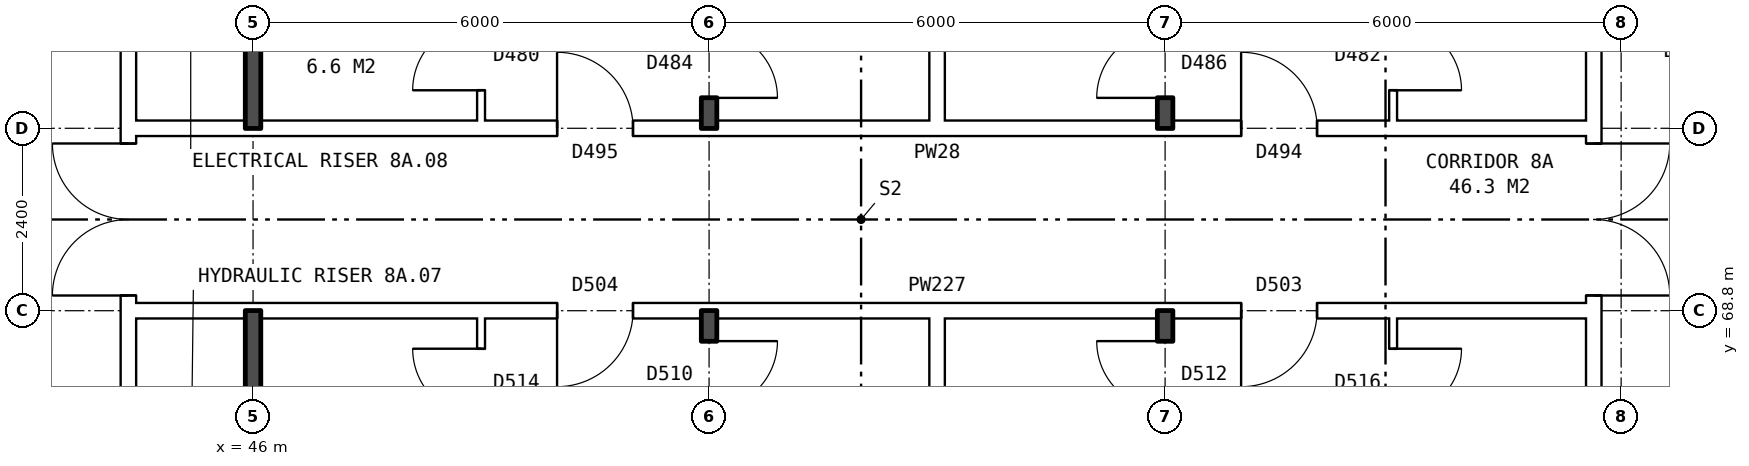
"""IFC4 building model, lengths in metres.
Left out: names, types, materials, properties, quantities, classifications, styles, units other than length and angle.
Written with IfcOpenShell. Run it as: python <this file> out.ifc"""

import sys

from ifc_helpers import new_model, si_unit, direction, frame, frame_2d, origin, place, context, subcontext, project, spatial, rectangle, extrude, element, fill, save


model = new_model("IFC4")
c1 = context("Model", 3, precision=1e-05, world=origin(), true_north=direction((0.0, 1.0)))
c2 = subcontext(c1, "Body", "Model", "MODEL_VIEW")
j1 = project(units=[si_unit("LENGTHUNIT", "METRE"), si_unit("PLANEANGLEUNIT", "RADIAN")], contexts=[c1])
p1 = place(None, origin())
s1 = spatial("IfcSite", under=j1, at=p1, CompositionType="ELEMENT")
p2 = place(p1, origin())
s2 = spatial("IfcBuilding", under=s1, at=p2, CompositionType="ELEMENT")
p3 = place(p2, frame((0.0, 0.0, 31.9)))
s3 = spatial("IfcBuildingStorey", under=s2, at=p3, CompositionType="ELEMENT", Elevation=31.9)
p4 = place(p3, frame((63.64, 63.9, 0.0), z_axis=(0.0, 0.0, 1.0), x_axis=(0.0, 1.0, 0.0)))
e1 = element("IfcWall", 1, at=p4, inside=s3, PredefinedType="PARTITIONING", context=c2, shape_type="SweptSolid", body=[
    extrude(rectangle(XDim=12.2, YDim=0.2, at=frame_2d((6.1, 0.0))), origin(), (0.0, 0.0, 1.0), 2.85),
])
p5 = place(p4, frame((5.1, 0.0, 0.0)))
e2 = element("IfcOpeningElement", 2, at=p5, cuts=e1, PredefinedType="OPENING", context=c2, shape_type="SweptSolid", body=[
    extrude(rectangle(XDim=2.0, YDim=2.1, at=frame_2d((1.0, 1.05))), frame((0.0, 0.11, 0.0), z_axis=(0.0, -1.0, 0.0), x_axis=(1.0, 0.0, 0.0)), (0.0, 0.0, 1.0), 0.22),
])
p6 = place(p3, frame((44.36, 63.9, 0.0), z_axis=(0.0, 0.0, 1.0), x_axis=(0.0, 1.0, 0.0)))
e3 = element("IfcWall", 3, at=p6, inside=s3, PredefinedType="PARTITIONING", context=c2, shape_type="SweptSolid", body=[
    extrude(rectangle(XDim=12.2, YDim=0.2, at=frame_2d((6.1, 0.0))), origin(), (0.0, 0.0, 1.0), 2.85),
])
p7 = place(p6, frame((5.1, 0.0, 0.0)))
e4 = element("IfcOpeningElement", 4, at=p7, cuts=e3, PredefinedType="OPENING", context=c2, shape_type="SweptSolid", body=[
    extrude(rectangle(XDim=2.0, YDim=2.1, at=frame_2d((1.0, 1.05))), frame((0.0, 0.11, 0.0), z_axis=(0.0, -1.0, 0.0), x_axis=(1.0, 0.0, 0.0)), (0.0, 0.0, 1.0), 0.22),
])
p8 = place(p3, frame((44.36, 68.8, 0.0), z_axis=(0.0, 0.0, 1.0), x_axis=(1.0, 0.0, 0.0)))
e5 = element("IfcWall", 5, at=p8, inside=s3, PredefinedType="PARTITIONING", context=c2, shape_type="SweptSolid", body=[
    extrude(rectangle(XDim=19.28, YDim=0.2, at=frame_2d((9.64, 0.0))), origin(), (0.0, 0.0, 1.0), 2.85),
])
p9 = place(p8, frame((14.64, 0.0, 0.0)))
e6 = element("IfcOpeningElement", 6, at=p9, cuts=e5, PredefinedType="OPENING", context=c2, shape_type="SweptSolid", body=[
    extrude(rectangle(XDim=1.0, YDim=2.1, at=frame_2d((0.5, 1.05))), frame((0.0, 0.11, 0.0), z_axis=(0.0, -1.0, 0.0), x_axis=(1.0, 0.0, 0.0)), (0.0, 0.0, 1.0), 0.22),
])
p10 = place(p8, frame((5.64, 0.0, 0.0)))
e7 = element("IfcOpeningElement", 7, at=p10, cuts=e5, PredefinedType="OPENING", context=c2, shape_type="SweptSolid", body=[
    extrude(rectangle(XDim=1.0, YDim=2.1, at=frame_2d((0.5, 1.05))), frame((0.0, 0.11, 0.0), z_axis=(0.0, -1.0, 0.0), x_axis=(1.0, 0.0, 0.0)), (0.0, 0.0, 1.0), 0.22),
])
p11 = place(p3, frame((44.36, 71.2, 0.0), z_axis=(0.0, 0.0, 1.0), x_axis=(1.0, 0.0, 0.0)))
e8 = element("IfcWall", 8, at=p11, inside=s3, PredefinedType="PARTITIONING", context=c2, shape_type="SweptSolid", body=[
    extrude(rectangle(XDim=19.28, YDim=0.2, at=frame_2d((9.64, 0.0))), origin(), (0.0, 0.0, 1.0), 2.85),
])
p12 = place(p11, frame((14.64, 0.0, 0.0)))
e9 = element("IfcOpeningElement", 9, at=p12, cuts=e8, PredefinedType="OPENING", context=c2, shape_type="SweptSolid", body=[
    extrude(rectangle(XDim=1.0, YDim=2.1, at=frame_2d((0.5, 1.05))), frame((0.0, 0.11, 0.0), z_axis=(0.0, -1.0, 0.0), x_axis=(1.0, 0.0, 0.0)), (0.0, 0.0, 1.0), 0.22),
])
p13 = place(p11, frame((5.64, 0.0, 0.0)))
e10 = element("IfcOpeningElement", 10, at=p13, cuts=e8, PredefinedType="OPENING", context=c2, shape_type="SweptSolid", body=[
    extrude(rectangle(XDim=1.0, YDim=2.1, at=frame_2d((0.5, 1.05))), frame((0.0, 0.11, 0.0), z_axis=(0.0, -1.0, 0.0), x_axis=(1.0, 0.0, 0.0)), (0.0, 0.0, 1.0), 0.22),
])
for number, where, z_axis, x_axis in (
    (11, (46.0, 63.8, 0.0), (0.0, 0.0, 1.0), (0.0, 1.0, 0.0)),
    (12, (46.0, 71.2, 0.0), (0.0, 0.0, 1.0), (0.0, 1.0, 0.0)),
):
    element("IfcWall", number, at=place(p3, frame(where, z_axis=z_axis, x_axis=x_axis)), inside=s3, PredefinedType="SOLIDWALL", context=c2, shape_type="SweptSolid", body=[
        extrude(rectangle(XDim=5.0, YDim=0.2, at=frame_2d((2.5, 0.0))), origin(), (0.0, 0.0, 1.0), 2.85),
    ])
p14 = place(p3, frame((49.0, 54.36, 0.0), z_axis=(0.0, 0.0, 1.0), x_axis=(0.0, 1.0, 0.0)))
e13 = element("IfcWall", 13, at=p14, inside=s3, PredefinedType="PARTITIONING", context=c2, shape_type="SweptSolid", body=[
    extrude(rectangle(XDim=14.34, YDim=0.1, at=frame_2d((7.17, 0.0))), origin(), (0.0, 0.0, 1.0), 2.85),
])
p15 = place(p14, frame((4.2, 0.0, 0.0)))
e14 = element("IfcOpeningElement", 14, at=p15, cuts=e13, PredefinedType="OPENING", context=c2, shape_type="SweptSolid", body=[
    extrude(rectangle(XDim=0.9, YDim=2.1, at=frame_2d((0.45, 1.05))), frame((0.0, 0.06, 0.0), z_axis=(0.0, -1.0, 0.0), x_axis=(1.0, 0.0, 0.0)), (0.0, 0.0, 1.0), 0.12),
])
p16 = place(p14, frame((13.04, 0.0, 0.0)))
e15 = element("IfcOpeningElement", 15, at=p16, cuts=e13, PredefinedType="OPENING", context=c2, shape_type="SweptSolid", body=[
    extrude(rectangle(XDim=0.9, YDim=2.1, at=frame_2d((0.45, 1.05))), frame((0.0, 0.06, 0.0), z_axis=(0.0, -1.0, 0.0), x_axis=(1.0, 0.0, 0.0)), (0.0, 0.0, 1.0), 0.12),
])
p17 = place(p3, frame((49.0, 71.3, 0.0), z_axis=(0.0, 0.0, 1.0), x_axis=(0.0, 1.0, 0.0)))
e16 = element("IfcWall", 16, at=p17, inside=s3, PredefinedType="PARTITIONING", context=c2, shape_type="SweptSolid", body=[
    extrude(rectangle(XDim=14.34, YDim=0.1, at=frame_2d((7.17, 0.0))), origin(), (0.0, 0.0, 1.0), 2.85),
])
p18 = place(p17, frame((9.24, 0.0, 0.0)))
e17 = element("IfcOpeningElement", 17, at=p18, cuts=e16, PredefinedType="OPENING", context=c2, shape_type="SweptSolid", body=[
    extrude(rectangle(XDim=0.9, YDim=2.1, at=frame_2d((0.45, 1.05))), frame((0.0, 0.06, 0.0), z_axis=(0.0, -1.0, 0.0), x_axis=(1.0, 0.0, 0.0)), (0.0, 0.0, 1.0), 0.12),
])
p19 = place(p17, frame((0.4, 0.0, 0.0)))
e18 = element("IfcOpeningElement", 18, at=p19, cuts=e16, PredefinedType="OPENING", context=c2, shape_type="SweptSolid", body=[
    extrude(rectangle(XDim=0.9, YDim=2.1, at=frame_2d((0.45, 1.05))), frame((0.0, 0.06, 0.0), z_axis=(0.0, -1.0, 0.0), x_axis=(1.0, 0.0, 0.0)), (0.0, 0.0, 1.0), 0.12),
])
p20 = place(p3, frame((52.0, 54.36, 0.0), z_axis=(0.0, 0.0, 1.0), x_axis=(0.0, 1.0, 0.0)))
e19 = element("IfcWall", 19, at=p20, inside=s3, PredefinedType="SOLIDWALL", context=c2, shape_type="SweptSolid", body=[
    extrude(rectangle(XDim=14.44, YDim=0.2, at=frame_2d((7.22, 0.0))), origin(), (0.0, 0.0, 1.0), 2.85),
])
p21 = place(p20, frame((4.2, 0.0, 0.0)))
e20 = element("IfcOpeningElement", 20, at=p21, cuts=e19, PredefinedType="OPENING", context=c2, shape_type="SweptSolid", body=[
    extrude(rectangle(XDim=0.9, YDim=2.1, at=frame_2d((0.45, 1.05))), frame((0.0, 0.11, 0.0), z_axis=(0.0, -1.0, 0.0), x_axis=(1.0, 0.0, 0.0)), (0.0, 0.0, 1.0), 0.22),
])
p22 = place(p20, frame((13.14, 0.0, 0.0)))
e21 = element("IfcOpeningElement", 21, at=p22, cuts=e19, PredefinedType="OPENING", context=c2, shape_type="SweptSolid", body=[
    extrude(rectangle(XDim=0.9, YDim=2.1, at=frame_2d((0.45, 1.05))), frame((0.0, 0.11, 0.0), z_axis=(0.0, -1.0, 0.0), x_axis=(1.0, 0.0, 0.0)), (0.0, 0.0, 1.0), 0.22),
])
p23 = place(p3, frame((52.0, 71.2, 0.0), z_axis=(0.0, 0.0, 1.0), x_axis=(0.0, 1.0, 0.0)))
e22 = element("IfcWall", 22, at=p23, inside=s3, PredefinedType="SOLIDWALL", context=c2, shape_type="SweptSolid", body=[
    extrude(rectangle(XDim=14.44, YDim=0.2, at=frame_2d((7.22, 0.0))), origin(), (0.0, 0.0, 1.0), 2.85),
])
p24 = place(p23, frame((9.34, 0.0, 0.0)))
e23 = element("IfcOpeningElement", 23, at=p24, cuts=e22, PredefinedType="OPENING", context=c2, shape_type="SweptSolid", body=[
    extrude(rectangle(XDim=0.9, YDim=2.1, at=frame_2d((0.45, 1.05))), frame((0.0, 0.11, 0.0), z_axis=(0.0, -1.0, 0.0), x_axis=(1.0, 0.0, 0.0)), (0.0, 0.0, 1.0), 0.22),
])
p25 = place(p23, frame((0.4, 0.0, 0.0)))
e24 = element("IfcOpeningElement", 24, at=p25, cuts=e22, PredefinedType="OPENING", context=c2, shape_type="SweptSolid", body=[
    extrude(rectangle(XDim=0.9, YDim=2.1, at=frame_2d((0.45, 1.05))), frame((0.0, 0.11, 0.0), z_axis=(0.0, -1.0, 0.0), x_axis=(1.0, 0.0, 0.0)), (0.0, 0.0, 1.0), 0.22),
])
for number, where, z_axis, x_axis in (
    (25, (55.0, 54.36, 0.0), (0.0, 0.0, 1.0), (0.0, 1.0, 0.0)),
    (26, (55.0, 71.3, 0.0), (0.0, 0.0, 1.0), (0.0, 1.0, 0.0)),
):
    element("IfcWall", number, at=place(p3, frame(where, z_axis=z_axis, x_axis=x_axis)), inside=s3, PredefinedType="PARTITIONING", context=c2, shape_type="SweptSolid", body=[
        extrude(rectangle(XDim=14.34, YDim=0.2, at=frame_2d((7.17, 0.0))), origin(), (0.0, 0.0, 1.0), 2.85),
    ])
p26 = place(p3, frame((58.0, 54.36, 0.0), z_axis=(0.0, 0.0, 1.0), x_axis=(0.0, 1.0, 0.0)))
e27 = element("IfcWall", 27, at=p26, inside=s3, PredefinedType="SOLIDWALL", context=c2, shape_type="SweptSolid", body=[
    extrude(rectangle(XDim=14.44, YDim=0.2, at=frame_2d((7.22, 0.0))), origin(), (0.0, 0.0, 1.0), 2.85),
])
p27 = place(p26, frame((4.2, 0.0, 0.0)))
e28 = element("IfcOpeningElement", 28, at=p27, cuts=e27, PredefinedType="OPENING", context=c2, shape_type="SweptSolid", body=[
    extrude(rectangle(XDim=0.9, YDim=2.1, at=frame_2d((0.45, 1.05))), frame((0.0, 0.11, 0.0), z_axis=(0.0, -1.0, 0.0), x_axis=(1.0, 0.0, 0.0)), (0.0, 0.0, 1.0), 0.22),
])
p28 = place(p26, frame((13.14, 0.0, 0.0)))
e29 = element("IfcOpeningElement", 29, at=p28, cuts=e27, PredefinedType="OPENING", context=c2, shape_type="SweptSolid", body=[
    extrude(rectangle(XDim=0.9, YDim=2.1, at=frame_2d((0.45, 1.05))), frame((0.0, 0.11, 0.0), z_axis=(0.0, -1.0, 0.0), x_axis=(1.0, 0.0, 0.0)), (0.0, 0.0, 1.0), 0.22),
])
p29 = place(p3, frame((58.0, 71.2, 0.0), z_axis=(0.0, 0.0, 1.0), x_axis=(0.0, 1.0, 0.0)))
e30 = element("IfcWall", 30, at=p29, inside=s3, PredefinedType="SOLIDWALL", context=c2, shape_type="SweptSolid", body=[
    extrude(rectangle(XDim=14.44, YDim=0.2, at=frame_2d((7.22, 0.0))), origin(), (0.0, 0.0, 1.0), 2.85),
])
p30 = place(p29, frame((6.84, 0.0, 0.0)))
e31 = element("IfcOpeningElement", 31, at=p30, cuts=e30, PredefinedType="OPENING", context=c2, shape_type="SweptSolid", body=[
    extrude(rectangle(XDim=0.9, YDim=2.1, at=frame_2d((0.45, 1.05))), frame((0.0, 0.11, 0.0), z_axis=(0.0, -1.0, 0.0), x_axis=(1.0, 0.0, 0.0)), (0.0, 0.0, 1.0), 0.22),
])
p31 = place(p29, frame((0.4, 0.0, 0.0)))
e32 = element("IfcOpeningElement", 32, at=p31, cuts=e30, PredefinedType="OPENING", context=c2, shape_type="SweptSolid", body=[
    extrude(rectangle(XDim=0.9, YDim=2.1, at=frame_2d((0.45, 1.05))), frame((0.0, 0.11, 0.0), z_axis=(0.0, -1.0, 0.0), x_axis=(1.0, 0.0, 0.0)), (0.0, 0.0, 1.0), 0.22),
])
p32 = place(p3, frame((61.0, 54.36, 0.0), z_axis=(0.0, 0.0, 1.0), x_axis=(0.0, 1.0, 0.0)))
e33 = element("IfcWall", 33, at=p32, inside=s3, PredefinedType="PARTITIONING", context=c2, shape_type="SweptSolid", body=[
    extrude(rectangle(XDim=14.34, YDim=0.1, at=frame_2d((7.17, 0.0))), origin(), (0.0, 0.0, 1.0), 2.85),
])
p33 = place(p32, frame((4.2, 0.0, 0.0)))
e34 = element("IfcOpeningElement", 34, at=p33, cuts=e33, PredefinedType="OPENING", context=c2, shape_type="SweptSolid", body=[
    extrude(rectangle(XDim=0.9, YDim=2.1, at=frame_2d((0.45, 1.05))), frame((0.0, 0.06, 0.0), z_axis=(0.0, -1.0, 0.0), x_axis=(1.0, 0.0, 0.0)), (0.0, 0.0, 1.0), 0.12),
])
p34 = place(p32, frame((13.04, 0.0, 0.0)))
e35 = element("IfcOpeningElement", 35, at=p34, cuts=e33, PredefinedType="OPENING", context=c2, shape_type="SweptSolid", body=[
    extrude(rectangle(XDim=0.9, YDim=2.1, at=frame_2d((0.45, 1.05))), frame((0.0, 0.06, 0.0), z_axis=(0.0, -1.0, 0.0), x_axis=(1.0, 0.0, 0.0)), (0.0, 0.0, 1.0), 0.12),
])
p35 = place(p3, frame((61.0, 71.3, 0.0), z_axis=(0.0, 0.0, 1.0), x_axis=(0.0, 1.0, 0.0)))
e36 = element("IfcWall", 36, at=p35, inside=s3, PredefinedType="PARTITIONING", context=c2, shape_type="SweptSolid", body=[
    extrude(rectangle(XDim=14.34, YDim=0.1, at=frame_2d((7.17, 0.0))), origin(), (0.0, 0.0, 1.0), 2.85),
])
p36 = place(p35, frame((6.74, 0.0, 0.0)))
e37 = element("IfcOpeningElement", 37, at=p36, cuts=e36, PredefinedType="OPENING", context=c2, shape_type="SweptSolid", body=[
    extrude(rectangle(XDim=0.9, YDim=2.1, at=frame_2d((0.45, 1.05))), frame((0.0, 0.06, 0.0), z_axis=(0.0, -1.0, 0.0), x_axis=(1.0, 0.0, 0.0)), (0.0, 0.0, 1.0), 0.12),
])
p37 = place(p35, frame((0.4, 0.0, 0.0)))
e38 = element("IfcOpeningElement", 38, at=p37, cuts=e36, PredefinedType="OPENING", context=c2, shape_type="SweptSolid", body=[
    extrude(rectangle(XDim=0.9, YDim=2.1, at=frame_2d((0.45, 1.05))), frame((0.0, 0.06, 0.0), z_axis=(0.0, -1.0, 0.0), x_axis=(1.0, 0.0, 0.0)), (0.0, 0.0, 1.0), 0.12),
])
p38 = place(p5, frame((2.0, 0.0, 0.0), z_axis=(0.0, 0.0, 1.0), x_axis=(-1.0, 0.0, 0.0)))
e39 = element("IfcDoor", 39, at=p38, inside=s3, OperationType="DOUBLE_DOOR_SINGLE_SWING", PredefinedType="DOOR", context=c2, shape_type="SweptSolid", body=[
    extrude(rectangle(XDim=2.0, YDim=2.1, at=frame_2d((1.0, 1.05))), frame((0.0, 0.025, 0.0), z_axis=(0.0, -1.0, 0.0), x_axis=(1.0, 0.0, 0.0)), (0.0, 0.0, 1.0), 0.05),
])
fill(e2, e39)
p39 = place(p7, origin())
e40 = element("IfcDoor", 40, at=p39, inside=s3, OperationType="DOUBLE_DOOR_SINGLE_SWING", PredefinedType="DOOR", context=c2, shape_type="SweptSolid", body=[
    extrude(rectangle(XDim=2.0, YDim=2.1, at=frame_2d((1.0, 1.05))), frame((0.0, 0.025, 0.0), z_axis=(0.0, -1.0, 0.0), x_axis=(1.0, 0.0, 0.0)), (0.0, 0.0, 1.0), 0.05),
])
fill(e4, e40)
p40 = place(p9, frame((1.0, 0.0, 0.0), z_axis=(0.0, 0.0, 1.0), x_axis=(-1.0, 0.0, 0.0)))
e41 = element("IfcDoor", 41, at=p40, inside=s3, OperationType="SINGLE_SWING_RIGHT", PredefinedType="DOOR", context=c2, shape_type="SweptSolid", body=[
    extrude(rectangle(XDim=1.0, YDim=2.1, at=frame_2d((0.5, 1.05))), frame((0.0, 0.025, 0.0), z_axis=(0.0, -1.0, 0.0), x_axis=(1.0, 0.0, 0.0)), (0.0, 0.0, 1.0), 0.05),
])
fill(e6, e41)
p41 = place(p34, frame((0.9, 0.0, 0.0), z_axis=(0.0, 0.0, 1.0), x_axis=(-1.0, 0.0, 0.0)))
e42 = element("IfcDoor", 42, at=p41, inside=s3, OperationType="SINGLE_SWING_LEFT", PredefinedType="DOOR", context=c2, shape_type="SweptSolid", body=[
    extrude(rectangle(XDim=0.9, YDim=2.1, at=frame_2d((0.45, 1.05))), frame((0.0, 0.025, 0.0), z_axis=(0.0, -1.0, 0.0), x_axis=(1.0, 0.0, 0.0)), (0.0, 0.0, 1.0), 0.05),
])
fill(e35, e42)
p42 = place(p28, origin())
e43 = element("IfcDoor", 43, at=p42, inside=s3, OperationType="SINGLE_SWING_RIGHT", PredefinedType="DOOR", context=c2, shape_type="SweptSolid", body=[
    extrude(rectangle(XDim=0.9, YDim=2.1, at=frame_2d((0.45, 1.05))), frame((0.0, 0.025, 0.0), z_axis=(0.0, -1.0, 0.0), x_axis=(1.0, 0.0, 0.0)), (0.0, 0.0, 1.0), 0.05),
])
fill(e29, e43)
p43 = place(p10, frame((1.0, 0.0, 0.0), z_axis=(0.0, 0.0, 1.0), x_axis=(-1.0, 0.0, 0.0)))
e44 = element("IfcDoor", 44, at=p43, inside=s3, OperationType="SINGLE_SWING_RIGHT", PredefinedType="DOOR", context=c2, shape_type="SweptSolid", body=[
    extrude(rectangle(XDim=1.0, YDim=2.1, at=frame_2d((0.5, 1.05))), frame((0.0, 0.025, 0.0), z_axis=(0.0, -1.0, 0.0), x_axis=(1.0, 0.0, 0.0)), (0.0, 0.0, 1.0), 0.05),
])
fill(e7, e44)
p44 = place(p22, frame((0.9, 0.0, 0.0), z_axis=(0.0, 0.0, 1.0), x_axis=(-1.0, 0.0, 0.0)))
e45 = element("IfcDoor", 45, at=p44, inside=s3, OperationType="SINGLE_SWING_LEFT", PredefinedType="DOOR", context=c2, shape_type="SweptSolid", body=[
    extrude(rectangle(XDim=0.9, YDim=2.1, at=frame_2d((0.45, 1.05))), frame((0.0, 0.025, 0.0), z_axis=(0.0, -1.0, 0.0), x_axis=(1.0, 0.0, 0.0)), (0.0, 0.0, 1.0), 0.05),
])
fill(e21, e45)
p45 = place(p16, origin())
e46 = element("IfcDoor", 46, at=p45, inside=s3, OperationType="SINGLE_SWING_RIGHT", PredefinedType="DOOR", context=c2, shape_type="SweptSolid", body=[
    extrude(rectangle(XDim=0.9, YDim=2.1, at=frame_2d((0.45, 1.05))), frame((0.0, 0.025, 0.0), z_axis=(0.0, -1.0, 0.0), x_axis=(1.0, 0.0, 0.0)), (0.0, 0.0, 1.0), 0.05),
])
fill(e15, e46)
p46 = place(p12, origin())
e47 = element("IfcDoor", 47, at=p46, inside=s3, OperationType="SINGLE_SWING_LEFT", PredefinedType="DOOR", context=c2, shape_type="SweptSolid", body=[
    extrude(rectangle(XDim=1.0, YDim=2.1, at=frame_2d((0.5, 1.05))), frame((0.0, 0.025, 0.0), z_axis=(0.0, -1.0, 0.0), x_axis=(1.0, 0.0, 0.0)), (0.0, 0.0, 1.0), 0.05),
])
fill(e9, e47)
p47 = place(p37, frame((0.9, 0.0, 0.0), z_axis=(0.0, 0.0, 1.0), x_axis=(-1.0, 0.0, 0.0)))
e48 = element("IfcDoor", 48, at=p47, inside=s3, OperationType="SINGLE_SWING_RIGHT", PredefinedType="DOOR", context=c2, shape_type="SweptSolid", body=[
    extrude(rectangle(XDim=0.9, YDim=2.1, at=frame_2d((0.45, 1.05))), frame((0.0, 0.025, 0.0), z_axis=(0.0, -1.0, 0.0), x_axis=(1.0, 0.0, 0.0)), (0.0, 0.0, 1.0), 0.05),
])
fill(e38, e48)
p48 = place(p31, origin())
e49 = element("IfcDoor", 49, at=p48, inside=s3, OperationType="SINGLE_SWING_LEFT", PredefinedType="DOOR", context=c2, shape_type="SweptSolid", body=[
    extrude(rectangle(XDim=0.9, YDim=2.1, at=frame_2d((0.45, 1.05))), frame((0.0, 0.025, 0.0), z_axis=(0.0, -1.0, 0.0), x_axis=(1.0, 0.0, 0.0)), (0.0, 0.0, 1.0), 0.05),
])
fill(e32, e49)
p49 = place(p13, origin())
e50 = element("IfcDoor", 50, at=p49, inside=s3, OperationType="SINGLE_SWING_LEFT", PredefinedType="DOOR", context=c2, shape_type="SweptSolid", body=[
    extrude(rectangle(XDim=1.0, YDim=2.1, at=frame_2d((0.5, 1.05))), frame((0.0, 0.025, 0.0), z_axis=(0.0, -1.0, 0.0), x_axis=(1.0, 0.0, 0.0)), (0.0, 0.0, 1.0), 0.05),
])
fill(e10, e50)
p50 = place(p25, frame((0.9, 0.0, 0.0), z_axis=(0.0, 0.0, 1.0), x_axis=(-1.0, 0.0, 0.0)))
e51 = element("IfcDoor", 51, at=p50, inside=s3, OperationType="SINGLE_SWING_RIGHT", PredefinedType="DOOR", context=c2, shape_type="SweptSolid", body=[
    extrude(rectangle(XDim=0.9, YDim=2.1, at=frame_2d((0.45, 1.05))), frame((0.0, 0.025, 0.0), z_axis=(0.0, -1.0, 0.0), x_axis=(1.0, 0.0, 0.0)), (0.0, 0.0, 1.0), 0.05),
])
fill(e24, e51)
p51 = place(p19, origin())
e52 = element("IfcDoor", 52, at=p51, inside=s3, OperationType="SINGLE_SWING_LEFT", PredefinedType="DOOR", context=c2, shape_type="SweptSolid", body=[
    extrude(rectangle(XDim=0.9, YDim=2.1, at=frame_2d((0.45, 1.05))), frame((0.0, 0.025, 0.0), z_axis=(0.0, -1.0, 0.0), x_axis=(1.0, 0.0, 0.0)), (0.0, 0.0, 1.0), 0.05),
])
fill(e18, e52)
save(model, sys.argv[1])
